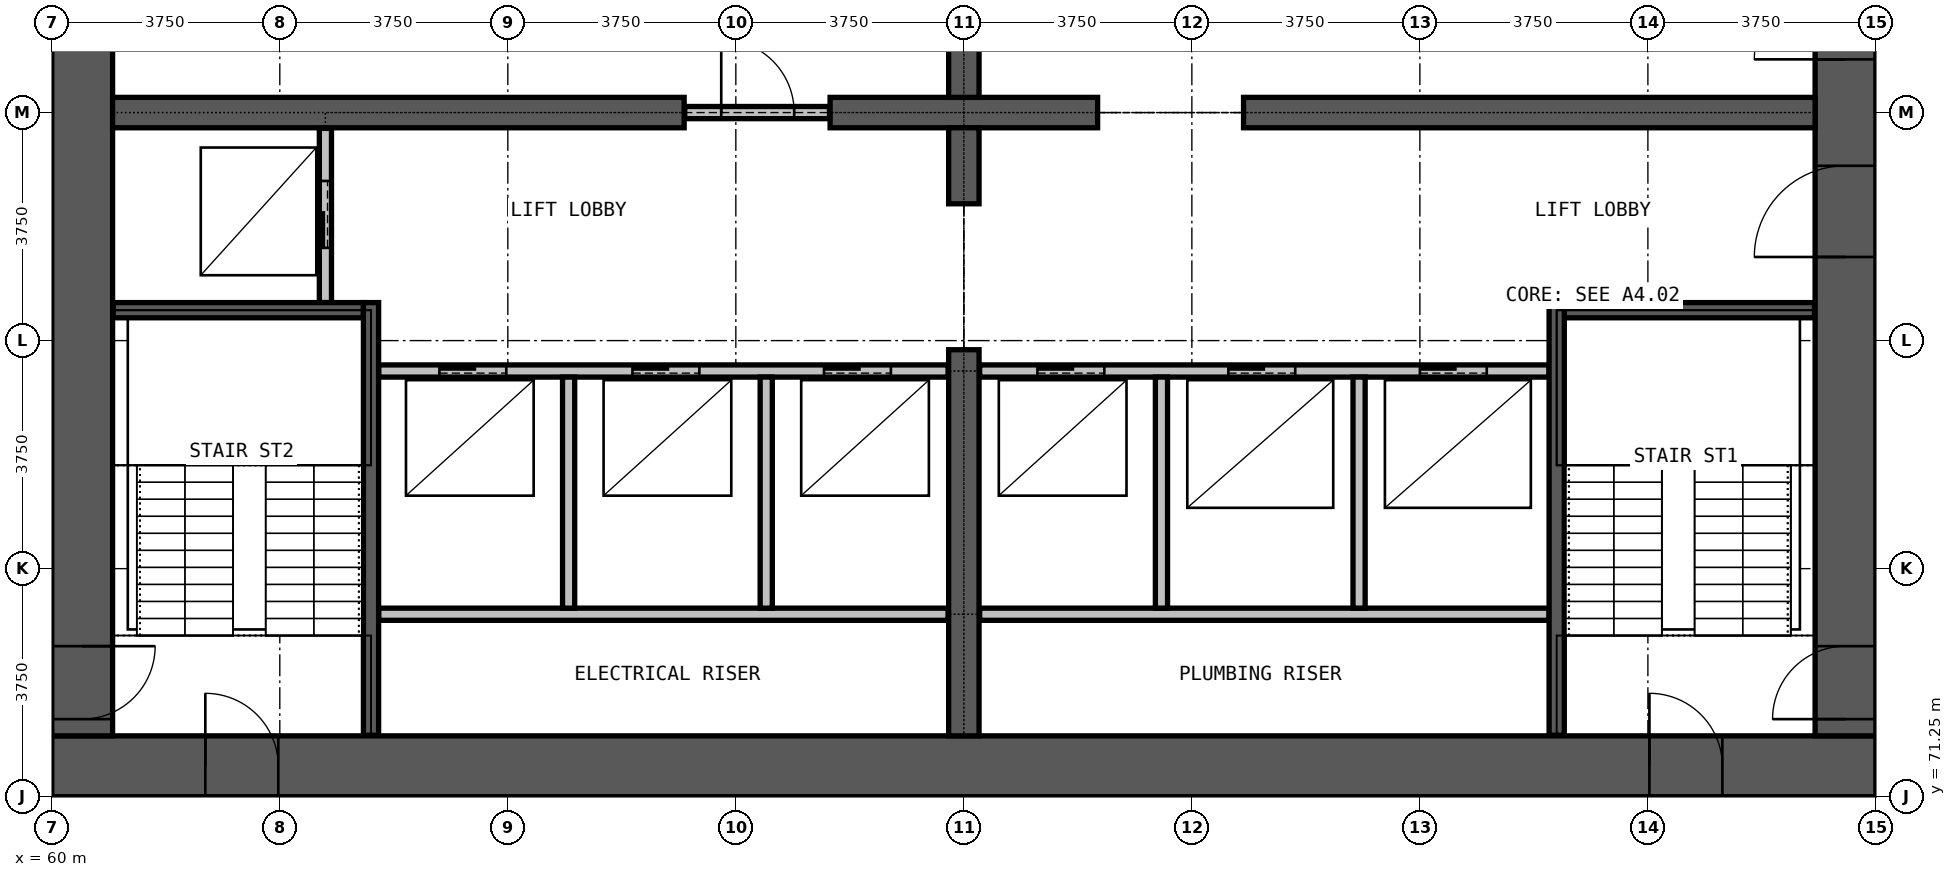
"""IFC4 building model, lengths in metres.
Left out: names, types, materials, properties, quantities, classifications, styles, units other than length and angle.
Written with IfcOpenShell. Run it as: python <this file> out.ifc"""

import sys

from ifc_helpers import new_model, si_unit, direction, frame, frame_2d, origin, place, context, subcontext, project, spatial, rectangle, extrude, element, fill, save


model = new_model("IFC4")
c1 = context("Model", 3, precision=1e-05, world=origin(), true_north=direction((0.0, 1.0)))
c2 = subcontext(c1, "Body", "Model", "MODEL_VIEW")
j1 = project(units=[si_unit("LENGTHUNIT", "METRE"), si_unit("PLANEANGLEUNIT", "RADIAN")], contexts=[c1])
p1 = place(None, origin())
s1 = spatial("IfcSite", under=j1, at=p1, CompositionType="ELEMENT")
p2 = place(p1, origin())
s2 = spatial("IfcBuilding", under=s1, at=p2, CompositionType="ELEMENT")
p3 = place(p2, origin())
s3 = spatial("IfcBuildingStorey", under=s2, at=p3, CompositionType="ELEMENT", Elevation=0.0)
p4 = place(p3, frame((60.0, 71.75, 0.0), z_axis=(0.0, 0.0, 1.0), x_axis=(1.0, 0.0, 0.0)))
e1 = element("IfcWall", 1, at=p4, inside=s3, PredefinedType="SHEAR", context=c2, shape_type="SweptSolid", body=[
    extrude(rectangle(XDim=30.0, YDim=1.0, at=frame_2d((15.0, 0.0))), origin(), (0.0, 0.0, 1.0), 7.5),
])
p5 = place(p4, frame((26.275, 0.0, 0.0)))
e2 = element("IfcOpeningElement", 2, at=p5, cuts=e1, PredefinedType="OPENING", context=c2, shape_type="SweptSolid", body=[
    extrude(rectangle(XDim=1.2, YDim=2.2, at=frame_2d((0.6, 1.1))), frame((0.0, 0.51, 0.0), z_axis=(0.0, -1.0, 0.0), x_axis=(1.0, 0.0, 0.0)), (0.0, 0.0, 1.0), 1.02),
])
p6 = place(p4, frame((2.525, 0.0, 0.0)))
e3 = element("IfcOpeningElement", 3, at=p6, cuts=e1, PredefinedType="OPENING", context=c2, shape_type="SweptSolid", body=[
    extrude(rectangle(XDim=1.2, YDim=2.2, at=frame_2d((0.6, 1.1))), frame((0.0, 0.51, 0.0), z_axis=(0.0, -1.0, 0.0), x_axis=(1.0, 0.0, 0.0)), (0.0, 0.0, 1.0), 1.02),
])
p7 = place(p3, frame((89.5, 72.25, 0.0), z_axis=(0.0, 0.0, 1.0), x_axis=(0.0, 1.0, 0.0)))
e4 = element("IfcWall", 4, at=p7, inside=s3, PredefinedType="SHEAR", context=c2, shape_type="SweptSolid", body=[
    extrude(rectangle(XDim=20.5, YDim=1.0, at=frame_2d((10.25, 0.0))), origin(), (0.0, 0.0, 1.0), 7.5),
])
p8 = place(p7, frame((0.275, 0.0, 0.0)))
e5 = element("IfcOpeningElement", 5, at=p8, cuts=e4, PredefinedType="OPENING", context=c2, shape_type="SweptSolid", body=[
    extrude(rectangle(XDim=1.2, YDim=2.2, at=frame_2d((0.6, 1.1))), frame((0.0, 0.51, 0.0), z_axis=(0.0, -1.0, 0.0), x_axis=(1.0, 0.0, 0.0)), (0.0, 0.0, 1.0), 1.02),
])
p9 = place(p7, frame((13.775, 0.0, 0.0)))
e6 = element("IfcOpeningElement", 6, at=p9, cuts=e4, PredefinedType="OPENING", context=c2, shape_type="SweptSolid", body=[
    extrude(rectangle(XDim=1.2, YDim=2.2, at=frame_2d((0.6, 1.1))), frame((0.0, 0.51, 0.0), z_axis=(0.0, -1.0, 0.0), x_axis=(1.0, 0.0, 0.0)), (0.0, 0.0, 1.0), 1.02),
])
p10 = place(p7, frame((7.875, 0.0, 0.0)))
e7 = element("IfcOpeningElement", 7, at=p10, cuts=e4, PredefinedType="OPENING", context=c2, shape_type="SweptSolid", body=[
    extrude(rectangle(XDim=1.5, YDim=2.2, at=frame_2d((0.75, 1.1))), frame((0.0, 0.51, 0.0), z_axis=(0.0, -1.0, 0.0), x_axis=(1.0, 0.0, 0.0)), (0.0, 0.0, 1.0), 1.02),
])
p11 = place(p7, frame((11.125, 0.0, 0.0)))
e8 = element("IfcOpeningElement", 8, at=p11, cuts=e4, PredefinedType="OPENING", context=c2, shape_type="SweptSolid", body=[
    extrude(rectangle(XDim=1.5, YDim=2.2, at=frame_2d((0.75, 1.1))), frame((0.0, 0.51, 0.0), z_axis=(0.0, -1.0, 0.0), x_axis=(1.0, 0.0, 0.0)), (0.0, 0.0, 1.0), 1.02),
])
p12 = place(p3, frame((60.5, 92.75, 0.0), z_axis=(0.0, 0.0, 1.0), x_axis=(0.0, -1.0, 0.0)))
e9 = element("IfcWall", 9, at=p12, inside=s3, PredefinedType="SHEAR", context=c2, shape_type="SweptSolid", body=[
    extrude(rectangle(XDim=20.5, YDim=1.0, at=frame_2d((10.25, 0.0))), origin(), (0.0, 0.0, 1.0), 7.5),
])
p13 = place(p12, frame((19.025, 0.0, 0.0)))
e10 = element("IfcOpeningElement", 10, at=p13, cuts=e9, PredefinedType="OPENING", context=c2, shape_type="SweptSolid", body=[
    extrude(rectangle(XDim=1.2, YDim=2.2, at=frame_2d((0.6, 1.1))), frame((0.0, 0.51, 0.0), z_axis=(0.0, -1.0, 0.0), x_axis=(1.0, 0.0, 0.0)), (0.0, 0.0, 1.0), 1.02),
])
p14 = place(p12, frame((8.025, 0.0, 0.0)))
e11 = element("IfcOpeningElement", 11, at=p14, cuts=e9, PredefinedType="OPENING", context=c2, shape_type="SweptSolid", body=[
    extrude(rectangle(XDim=1.2, YDim=2.2, at=frame_2d((0.6, 1.1))), frame((0.0, 0.51, 0.0), z_axis=(0.0, -1.0, 0.0), x_axis=(1.0, 0.0, 0.0)), (0.0, 0.0, 1.0), 1.02),
])
p15 = place(p3, frame((61.0, 82.5, 0.0), z_axis=(0.0, 0.0, 1.0), x_axis=(1.0, 0.0, 0.0)))
e12 = element("IfcWall", 12, at=p15, inside=s3, PredefinedType="SHEAR", context=c2, shape_type="SweptSolid", body=[
    extrude(rectangle(XDim=9.4, YDim=0.5, at=frame_2d((4.7, 0.0))), origin(), (0.0, 0.0, 1.0), 7.5),
])
p16 = place(p3, frame((72.8, 82.5, 0.0), z_axis=(0.0, 0.0, 1.0), x_axis=(1.0, 0.0, 0.0)))
e13 = element("IfcWall", 13, at=p16, inside=s3, PredefinedType="SHEAR", context=c2, shape_type="SweptSolid", body=[
    extrude(rectangle(XDim=4.4, YDim=0.5, at=frame_2d((2.2, 0.0))), origin(), (0.0, 0.0, 1.0), 7.5),
])
p17 = place(p3, frame((79.6, 82.5, 0.0), z_axis=(0.0, 0.0, 1.0), x_axis=(1.0, 0.0, 0.0)))
e14 = element("IfcWall", 14, at=p17, inside=s3, PredefinedType="SHEAR", context=c2, shape_type="SweptSolid", body=[
    extrude(rectangle(XDim=9.4, YDim=0.5, at=frame_2d((4.7, 0.0))), origin(), (0.0, 0.0, 1.0), 7.5),
])
p18 = place(p3, frame((75.0, 72.25, 0.0), z_axis=(0.0, 0.0, 1.0), x_axis=(0.0, 1.0, 0.0)))
e15 = element("IfcWall", 15, at=p18, inside=s3, PredefinedType="SHEAR", context=c2, shape_type="SweptSolid", body=[
    extrude(rectangle(XDim=6.35, YDim=0.5, at=frame_2d((3.175, 0.0))), origin(), (0.0, 0.0, 1.0), 7.5),
])
for number, where, z_axis, x_axis in (
    (16, (75.0, 81.0, 0.0), (0.0, 0.0, 1.0), (0.0, 1.0, 0.0)),
    (17, (75.0, 82.75, 0.0), (0.0, 0.0, 1.0), (0.0, 1.0, 0.0)),
):
    element("IfcWall", number, at=place(p3, frame(where, z_axis=z_axis, x_axis=x_axis)), inside=s3, PredefinedType="SHEAR", context=c2, shape_type="SweptSolid", body=[
        extrude(rectangle(XDim=1.25, YDim=0.5, at=frame_2d((0.625, 0.0))), origin(), (0.0, 0.0, 1.0), 7.5),
    ])
p19 = place(p3, frame((70.41, 82.5, 0.0), z_axis=(0.0, 0.0, 1.0), x_axis=(1.0, 0.0, 0.0)))
e18 = element("IfcWall", 18, at=p19, inside=s3, PredefinedType="PARTITIONING", context=c2, shape_type="SweptSolid", body=[
    extrude(rectangle(XDim=2.38, YDim=0.2, at=frame_2d((1.19, 0.0))), origin(), (0.0, 0.0, 1.0), 2.4),
])
p20 = place(p19, frame((0.6, 0.0, 0.0)))
e19 = element("IfcOpeningElement", 19, at=p20, cuts=e18, PredefinedType="OPENING", context=c2, shape_type="SweptSolid", body=[
    extrude(rectangle(XDim=1.2, YDim=2.2, at=frame_2d((0.6, 1.1))), frame((0.0, 0.11, 0.0), z_axis=(0.0, -1.0, 0.0), x_axis=(1.0, 0.0, 0.0)), (0.0, 0.0, 1.0), 0.22),
])
for number, where, z_axis, x_axis in (
    (20, (65.375, 74.25, 0.0), (0.0, 0.0, 1.0), (1.0, 0.0, 0.0)),
    (21, (75.26, 74.25, 0.0), (0.0, 0.0, 1.0), (1.0, 0.0, 0.0)),
):
    element("IfcWall", number, at=place(p3, frame(where, z_axis=z_axis, x_axis=x_axis)), inside=s3, PredefinedType="PARTITIONING", context=c2, shape_type="SweptSolid", body=[
        extrude(rectangle(XDim=9.365, YDim=0.2, at=frame_2d((4.683, 0.0))), origin(), (0.0, 0.0, 1.0), 7.15),
    ])
p21 = place(p3, frame((65.375, 78.25, 0.0), z_axis=(0.0, 0.0, 1.0), x_axis=(1.0, 0.0, 0.0)))
e22 = element("IfcWall", 22, at=p21, inside=s3, PredefinedType="PARTITIONING", context=c2, shape_type="SweptSolid", body=[
    extrude(rectangle(XDim=9.365, YDim=0.2, at=frame_2d((4.683, 0.0))), origin(), (0.0, 0.0, 1.0), 7.15),
])
p22 = place(p21, frame((1.0, 0.0, 0.0)))
e23 = element("IfcOpeningElement", 23, at=p22, cuts=e22, PredefinedType="OPENING", context=c2, shape_type="SweptSolid", body=[
    extrude(rectangle(XDim=1.1, YDim=2.2, at=frame_2d((0.55, 1.1))), frame((0.0, 0.11, 0.0), z_axis=(0.0, -1.0, 0.0), x_axis=(1.0, 0.0, 0.0)), (0.0, 0.0, 1.0), 0.22),
])
p23 = place(p21, frame((4.175, 0.0, 0.0)))
e24 = element("IfcOpeningElement", 24, at=p23, cuts=e22, PredefinedType="OPENING", context=c2, shape_type="SweptSolid", body=[
    extrude(rectangle(XDim=1.1, YDim=2.2, at=frame_2d((0.55, 1.1))), frame((0.0, 0.11, 0.0), z_axis=(0.0, -1.0, 0.0), x_axis=(1.0, 0.0, 0.0)), (0.0, 0.0, 1.0), 0.22),
])
p24 = place(p21, frame((7.325, 0.0, 0.0)))
e25 = element("IfcOpeningElement", 25, at=p24, cuts=e22, PredefinedType="OPENING", context=c2, shape_type="SweptSolid", body=[
    extrude(rectangle(XDim=1.1, YDim=2.2, at=frame_2d((0.55, 1.1))), frame((0.0, 0.11, 0.0), z_axis=(0.0, -1.0, 0.0), x_axis=(1.0, 0.0, 0.0)), (0.0, 0.0, 1.0), 0.22),
])
p25 = place(p3, frame((75.26, 78.25, 0.0), z_axis=(0.0, 0.0, 1.0), x_axis=(1.0, 0.0, 0.0)))
e26 = element("IfcWall", 26, at=p25, inside=s3, PredefinedType="PARTITIONING", context=c2, shape_type="SweptSolid", body=[
    extrude(rectangle(XDim=9.365, YDim=0.2, at=frame_2d((4.683, 0.0))), origin(), (0.0, 0.0, 1.0), 7.15),
])
p26 = place(p25, frame((0.95, 0.0, 0.0)))
e27 = element("IfcOpeningElement", 27, at=p26, cuts=e26, PredefinedType="OPENING", context=c2, shape_type="SweptSolid", body=[
    extrude(rectangle(XDim=1.1, YDim=2.2, at=frame_2d((0.55, 1.1))), frame((0.0, 0.11, 0.0), z_axis=(0.0, -1.0, 0.0), x_axis=(1.0, 0.0, 0.0)), (0.0, 0.0, 1.0), 0.22),
])
p27 = place(p25, frame((4.09, 0.0, 0.0)))
e28 = element("IfcOpeningElement", 28, at=p27, cuts=e26, PredefinedType="OPENING", context=c2, shape_type="SweptSolid", body=[
    extrude(rectangle(XDim=1.1, YDim=2.2, at=frame_2d((0.55, 1.1))), frame((0.0, 0.11, 0.0), z_axis=(0.0, -1.0, 0.0), x_axis=(1.0, 0.0, 0.0)), (0.0, 0.0, 1.0), 0.22),
])
p28 = place(p25, frame((7.24, 0.0, 0.0)))
e29 = element("IfcOpeningElement", 29, at=p28, cuts=e26, PredefinedType="OPENING", context=c2, shape_type="SweptSolid", body=[
    extrude(rectangle(XDim=1.1, YDim=2.2, at=frame_2d((0.55, 1.1))), frame((0.0, 0.11, 0.0), z_axis=(0.0, -1.0, 0.0), x_axis=(1.0, 0.0, 0.0)), (0.0, 0.0, 1.0), 0.22),
])
p29 = place(p3, frame((64.5, 79.375, 0.0), z_axis=(0.0, 0.0, 1.0), x_axis=(0.0, 1.0, 0.0)))
e30 = element("IfcWall", 30, at=p29, inside=s3, PredefinedType="PARTITIONING", context=c2, shape_type="SweptSolid", body=[
    extrude(rectangle(XDim=2.865, YDim=0.2, at=frame_2d((1.433, 0.0))), origin(), (0.0, 0.0, 1.0), 7.15),
])
p30 = place(p29, frame((0.9, 0.0, 0.0)))
e31 = element("IfcOpeningElement", 31, at=p30, cuts=e30, PredefinedType="OPENING", context=c2, shape_type="SweptSolid", body=[
    extrude(rectangle(XDim=1.1, YDim=2.2, at=frame_2d((0.55, 1.1))), frame((0.0, 0.11, 0.0), z_axis=(0.0, -1.0, 0.0), x_axis=(1.0, 0.0, 0.0)), (0.0, 0.0, 1.0), 0.22),
])
for number, where, z_axis, x_axis in (
    (32, (68.5, 74.35, 0.0), (0.0, 0.0, 1.0), (0.0, 1.0, 0.0)),
    (33, (71.75, 74.35, 0.0), (0.0, 0.0, 1.0), (0.0, 1.0, 0.0)),
    (34, (78.25, 74.35, 0.0), (0.0, 0.0, 1.0), (0.0, 1.0, 0.0)),
    (35, (81.5, 74.35, 0.0), (0.0, 0.0, 1.0), (0.0, 1.0, 0.0)),
):
    element("IfcWall", number, at=place(p3, frame(where, z_axis=z_axis, x_axis=x_axis)), inside=s3, PredefinedType="PARTITIONING", context=c2, shape_type="SweptSolid", body=[
        extrude(rectangle(XDim=3.8, YDim=0.2, at=frame_2d((1.9, 0.0))), origin(), (0.0, 0.0, 1.0), 7.15),
    ])
for number, where, z_axis, x_axis in (
    (36, (61.01, 79.25, 0.0), (0.0, 0.0, 1.0), (1.0, 0.0, 0.0)),
    (37, (84.875, 79.25, 0.0), (0.0, 0.0, 1.0), (1.0, 0.0, 0.0)),
):
    element("IfcWall", number, at=place(p3, frame(where, z_axis=z_axis, x_axis=x_axis)), inside=s3, PredefinedType="PARTITIONING", context=c2, shape_type="SweptSolid", body=[
        extrude(rectangle(XDim=4.115, YDim=0.25, at=frame_2d((2.058, 0.0))), origin(), (0.0, 0.0, 1.0), 7.15),
    ])
for number, where, z_axis, x_axis in (
    (38, (65.25, 72.26, 0.0), (0.0, 0.0, 1.0), (0.0, 1.0, 0.0)),
    (39, (84.75, 72.26, 0.0), (0.0, 0.0, 1.0), (0.0, 1.0, 0.0)),
):
    element("IfcWall", number, at=place(p3, frame(where, z_axis=z_axis, x_axis=x_axis)), inside=s3, PredefinedType="PARTITIONING", context=c2, shape_type="SweptSolid", body=[
        extrude(rectangle(XDim=7.115, YDim=0.25, at=frame_2d((3.558, 0.0))), origin(), (0.0, 0.0, 1.0), 7.15),
    ])
p31 = place(p22, origin())
e40 = element("IfcDoor", 40, at=p31, inside=s3, OperationType="DOUBLE_DOOR_SLIDING", PredefinedType="DOOR", context=c2, shape_type="SweptSolid", body=[
    extrude(rectangle(XDim=1.1, YDim=2.2, at=frame_2d((0.55, 1.1))), frame((0.0, 0.025, 0.0), z_axis=(0.0, -1.0, 0.0), x_axis=(1.0, 0.0, 0.0)), (0.0, 0.0, 1.0), 0.05),
])
fill(e23, e40)
p32 = place(p23, origin())
e41 = element("IfcDoor", 41, at=p32, inside=s3, OperationType="DOUBLE_DOOR_SLIDING", PredefinedType="DOOR", context=c2, shape_type="SweptSolid", body=[
    extrude(rectangle(XDim=1.1, YDim=2.2, at=frame_2d((0.55, 1.1))), frame((0.0, 0.025, 0.0), z_axis=(0.0, -1.0, 0.0), x_axis=(1.0, 0.0, 0.0)), (0.0, 0.0, 1.0), 0.05),
])
fill(e24, e41)
p33 = place(p24, origin())
e42 = element("IfcDoor", 42, at=p33, inside=s3, OperationType="DOUBLE_DOOR_SLIDING", PredefinedType="DOOR", context=c2, shape_type="SweptSolid", body=[
    extrude(rectangle(XDim=1.1, YDim=2.2, at=frame_2d((0.55, 1.1))), frame((0.0, 0.025, 0.0), z_axis=(0.0, -1.0, 0.0), x_axis=(1.0, 0.0, 0.0)), (0.0, 0.0, 1.0), 0.05),
])
fill(e25, e42)
p34 = place(p26, origin())
e43 = element("IfcDoor", 43, at=p34, inside=s3, OperationType="DOUBLE_DOOR_SLIDING", PredefinedType="DOOR", context=c2, shape_type="SweptSolid", body=[
    extrude(rectangle(XDim=1.1, YDim=2.2, at=frame_2d((0.55, 1.1))), frame((0.0, 0.025, 0.0), z_axis=(0.0, -1.0, 0.0), x_axis=(1.0, 0.0, 0.0)), (0.0, 0.0, 1.0), 0.05),
])
fill(e27, e43)
p35 = place(p27, origin())
e44 = element("IfcDoor", 44, at=p35, inside=s3, OperationType="DOUBLE_DOOR_SLIDING", PredefinedType="DOOR", context=c2, shape_type="SweptSolid", body=[
    extrude(rectangle(XDim=1.1, YDim=2.2, at=frame_2d((0.55, 1.1))), frame((0.0, 0.025, 0.0), z_axis=(0.0, -1.0, 0.0), x_axis=(1.0, 0.0, 0.0)), (0.0, 0.0, 1.0), 0.05),
])
fill(e28, e44)
p36 = place(p28, origin())
e45 = element("IfcDoor", 45, at=p36, inside=s3, OperationType="DOUBLE_DOOR_SLIDING", PredefinedType="DOOR", context=c2, shape_type="SweptSolid", body=[
    extrude(rectangle(XDim=1.1, YDim=2.2, at=frame_2d((0.55, 1.1))), frame((0.0, 0.025, 0.0), z_axis=(0.0, -1.0, 0.0), x_axis=(1.0, 0.0, 0.0)), (0.0, 0.0, 1.0), 0.05),
])
fill(e29, e45)
p37 = place(p30, origin())
e46 = element("IfcDoor", 46, at=p37, inside=s3, OperationType="DOUBLE_DOOR_SLIDING", PredefinedType="DOOR", context=c2, shape_type="SweptSolid", body=[
    extrude(rectangle(XDim=1.1, YDim=2.2, at=frame_2d((0.55, 1.1))), frame((0.0, 0.025, 0.0), z_axis=(0.0, -1.0, 0.0), x_axis=(1.0, 0.0, 0.0)), (0.0, 0.0, 1.0), 0.05),
])
fill(e31, e46)
p38 = place(p20, origin())
e47 = element("IfcDoor", 47, at=p38, inside=s3, OperationType="SINGLE_SWING_LEFT", PredefinedType="DOOR", context=c2, shape_type="SweptSolid", body=[
    extrude(rectangle(XDim=1.2, YDim=2.2, at=frame_2d((0.6, 1.1))), frame((0.0, 0.025, 0.0), z_axis=(0.0, -1.0, 0.0), x_axis=(1.0, 0.0, 0.0)), (0.0, 0.0, 1.0), 0.05),
])
fill(e19, e47)
p39 = place(p8, origin())
e48 = element("IfcDoor", 48, at=p39, inside=s3, OperationType="SINGLE_SWING_RIGHT", PredefinedType="DOOR", context=c2, shape_type="SweptSolid", body=[
    extrude(rectangle(XDim=1.2, YDim=2.2, at=frame_2d((0.6, 1.1))), frame((0.0, 0.025, 0.0), z_axis=(0.0, -1.0, 0.0), x_axis=(1.0, 0.0, 0.0)), (0.0, 0.0, 1.0), 0.05),
])
fill(e5, e48)
p40 = place(p13, origin())
e49 = element("IfcDoor", 49, at=p40, inside=s3, OperationType="SINGLE_SWING_LEFT", PredefinedType="DOOR", context=c2, shape_type="SweptSolid", body=[
    extrude(rectangle(XDim=1.2, YDim=2.2, at=frame_2d((0.6, 1.1))), frame((0.0, 0.025, 0.0), z_axis=(0.0, -1.0, 0.0), x_axis=(1.0, 0.0, 0.0)), (0.0, 0.0, 1.0), 0.05),
])
fill(e10, e49)
p41 = place(p5, origin())
e50 = element("IfcDoor", 50, at=p41, inside=s3, OperationType="SINGLE_SWING_LEFT", PredefinedType="DOOR", context=c2, shape_type="SweptSolid", body=[
    extrude(rectangle(XDim=1.2, YDim=2.2, at=frame_2d((0.6, 1.1))), frame((0.0, 0.025, 0.0), z_axis=(0.0, -1.0, 0.0), x_axis=(1.0, 0.0, 0.0)), (0.0, 0.0, 1.0), 0.05),
])
fill(e2, e50)
p42 = place(p6, origin())
e51 = element("IfcDoor", 51, at=p42, inside=s3, OperationType="SINGLE_SWING_LEFT", PredefinedType="DOOR", context=c2, shape_type="SweptSolid", body=[
    extrude(rectangle(XDim=1.2, YDim=2.2, at=frame_2d((0.6, 1.1))), frame((0.0, 0.025, 0.0), z_axis=(0.0, -1.0, 0.0), x_axis=(1.0, 0.0, 0.0)), (0.0, 0.0, 1.0), 0.05),
])
fill(e3, e51)
p43 = place(p10, origin())
e52 = element("IfcDoor", 52, at=p43, inside=s3, OperationType="DOUBLE_DOOR_SINGLE_SWING", PredefinedType="DOOR", context=c2, shape_type="SweptSolid", body=[
    extrude(rectangle(XDim=1.5, YDim=2.2, at=frame_2d((0.75, 1.1))), frame((0.0, 0.025, 0.0), z_axis=(0.0, -1.0, 0.0), x_axis=(1.0, 0.0, 0.0)), (0.0, 0.0, 1.0), 0.05),
])
fill(e7, e52)
p44 = place(p11, origin())
e53 = element("IfcDoor", 53, at=p44, inside=s3, OperationType="DOUBLE_DOOR_SINGLE_SWING", PredefinedType="DOOR", context=c2, shape_type="SweptSolid", body=[
    extrude(rectangle(XDim=1.5, YDim=2.2, at=frame_2d((0.75, 1.1))), frame((0.0, 0.025, 0.0), z_axis=(0.0, -1.0, 0.0), x_axis=(1.0, 0.0, 0.0)), (0.0, 0.0, 1.0), 0.05),
])
fill(e8, e53)
save(model, sys.argv[1])
